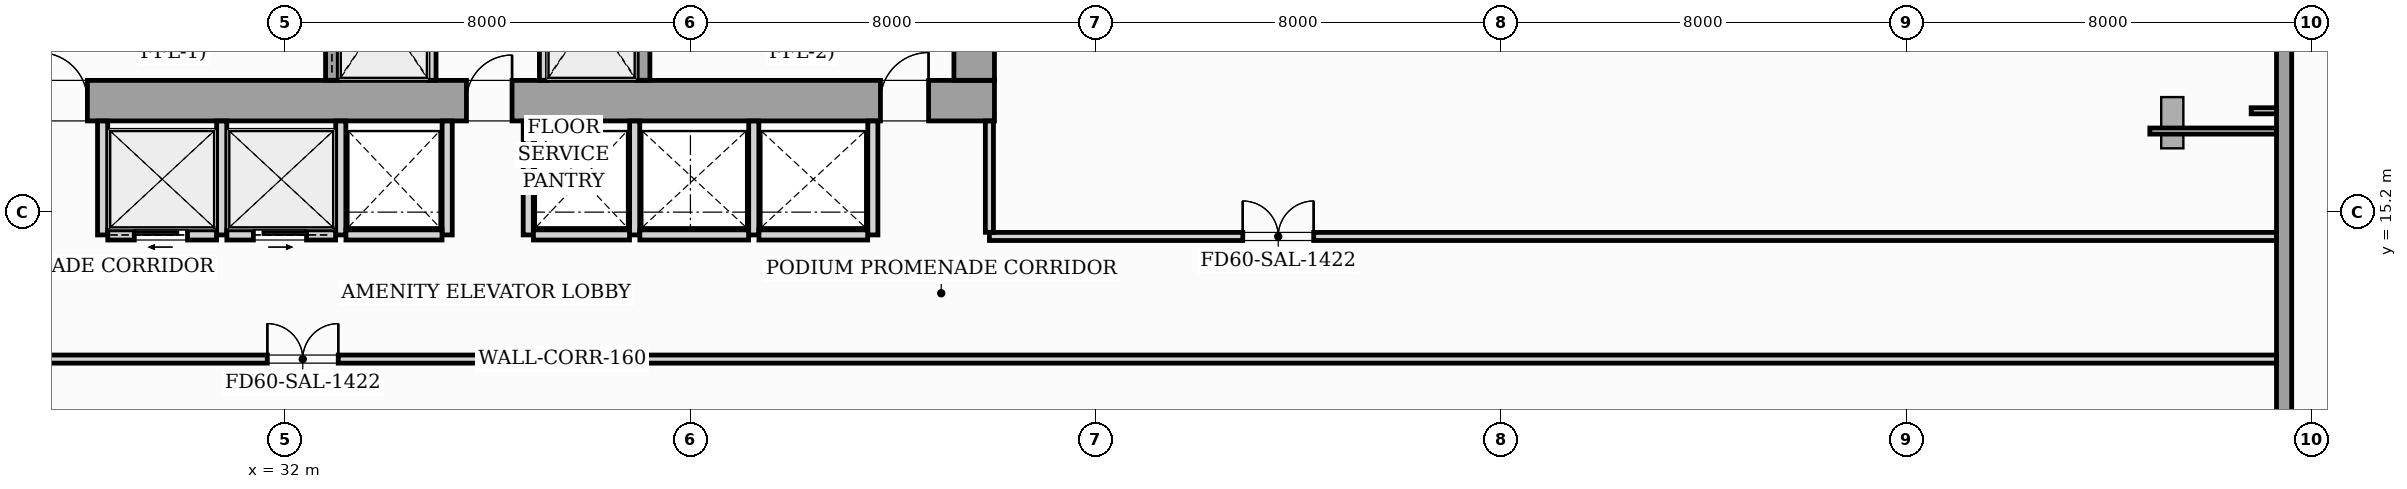
"""IFC4 building model, lengths in metres.
Left out: names, types, materials, properties, quantities, classifications, styles, units other than length and angle.
Written with IfcOpenShell. Run it as: python <this file> out.ifc"""

import sys

from ifc_helpers import new_model, si_unit, direction, frame, frame_2d, origin, origin_2d, place, context, subcontext, project, spatial, rectangle, i_section, extrude, source, transform, mapped, element, fill, save


model = new_model("IFC4")
c1 = context("Model", 3, precision=1e-05, world=origin(), true_north=direction((0.0, 1.0)))
c2 = subcontext(c1, "Body", "Model", "MODEL_VIEW")
j1 = project(units=[si_unit("LENGTHUNIT", "METRE"), si_unit("PLANEANGLEUNIT", "RADIAN")], contexts=[c1])
p1 = place(None, origin())
s1 = spatial("IfcSite", under=j1, at=p1, CompositionType="ELEMENT")
p2 = place(p1, origin())
s2 = spatial("IfcBuilding", under=s1, at=p2, CompositionType="ELEMENT")
p3 = place(p2, frame((0.0, 0.0, 14.0)))
s3 = spatial("IfcBuildingStorey", under=s2, at=p3, CompositionType="ELEMENT", Elevation=14.0)
m1 = source(origin(), c2, "Body", "SweptSolid", [
    extrude(i_section(OverallWidth=0.437, OverallDepth=0.514, WebThickness=0.061, FlangeThickness=0.097, FilletRadius=0.018, at=origin_2d()), origin(), (0.0, 0.0, 1.0), 4.496),
])
for number, where, z_axis, x_axis in (
    (1, (33.12, 17.4, 0.002), (0.0, 0.0, 1.0), (1.0, 0.0, 0.0)),
    (2, (38.88, 17.4, 0.002), (0.0, 0.0, 1.0), (1.0, 0.0, 0.0)),
    (3, (45.6, 17.4, 0.002), (0.0, 0.0, 1.0), (1.0, 0.0, 0.0)),
):
    element("IfcColumn", number, at=place(p3, frame(where, z_axis=z_axis, x_axis=x_axis)), inside=s3, PredefinedType="PILASTER", context=c2, shape_type="MappedRepresentation", body=[
        mapped(m1, transform((0.0, 0.0, 0.0), scale=1.0)),
    ])
m2 = source(origin(), c2, "Body", "SweptSolid", [
    extrude(i_section(OverallWidth=0.438, OverallDepth=1.011, WebThickness=0.041, FlangeThickness=0.074, FilletRadius=0.024, at=origin_2d()), origin(), (0.0, 0.0, 1.0), 5.298),
])
p4 = place(p3, frame((70.257, 17.167, 0.167), z_axis=(-0.693307662759, -0.138652316712, 0.70717750235), x_axis=(0.693446365663, 0.138680055449, 0.707036052949)))
e4 = element("IfcColumn", 4, at=p4, inside=s3, PredefinedType="COLUMN", context=c2, shape_type="MappedRepresentation", body=[
    mapped(m2, transform((0.0, 0.0, 0.0), scale=1.0)),
])
p5 = place(p3, frame((71.45, 32.85, 0.0), z_axis=(0.0, 0.0, 1.0), x_axis=(0.0, -1.0, 0.0)))
e5 = element("IfcWall", 5, at=p5, inside=s3, PredefinedType="STANDARD", context=c2, shape_type="SweptSolid", body=[
    extrude(rectangle(XDim=31.3, YDim=0.3, at=frame_2d((15.65, 0.0))), origin(), (0.0, 0.0, 1.0), 4.08),
])
p6 = place(p5, frame((7.85, 0.0, 0.0)))
e6 = element("IfcOpeningElement", 6, at=p6, cuts=e5, PredefinedType="OPENING", context=c2, shape_type="SweptSolid", body=[
    extrude(rectangle(XDim=1.6, YDim=2.1, at=frame_2d((0.8, 1.05))), frame((0.0, 0.16, 0.0), z_axis=(0.0, -1.0, 0.0), x_axis=(1.0, 0.0, 0.0)), (0.0, 0.0, 1.0), 0.32),
])
p7 = place(p5, frame((25.65, 0.0, 0.9)))
e7 = element("IfcOpeningElement", 7, at=p7, cuts=e5, PredefinedType="OPENING", context=c2, shape_type="SweptSolid", body=[
    extrude(rectangle(XDim=2.0, YDim=2.4, at=frame_2d((1.0, 1.2))), frame((0.0, 0.16, 0.0), z_axis=(0.0, -1.0, 0.0), x_axis=(1.0, 0.0, 0.0)), (0.0, 0.0, 1.0), 0.32),
])
p8 = place(p3, frame((26.0, 17.4, 0.0), z_axis=(0.0, 0.0, 1.0), x_axis=(1.0, 0.0, 0.0)))
e8 = element("IfcWall", 8, at=p8, inside=s3, PredefinedType="SHEAR", context=c2, shape_type="SweptSolid", body=[
    extrude(rectangle(XDim=20.0, YDim=0.8, at=frame_2d((10.0, 0.0))), origin(), (0.0, 0.0, 1.0), 4.5),
])
p9 = place(p8, frame((1.15, 0.0, 0.0)))
e9 = element("IfcOpeningElement", 9, at=p9, cuts=e8, PredefinedType="OPENING", context=c2, shape_type="SweptSolid", body=[
    extrude(rectangle(XDim=0.95, YDim=2.06, at=frame_2d((0.475, 1.03))), frame((0.0, 0.41, 0.0), z_axis=(0.0, -1.0, 0.0), x_axis=(1.0, 0.0, 0.0)), (0.0, 0.0, 1.0), 0.82),
])
p10 = place(p8, frame((9.58, 0.0, 0.0)))
e10 = element("IfcOpeningElement", 10, at=p10, cuts=e8, PredefinedType="OPENING", context=c2, shape_type="SweptSolid", body=[
    extrude(rectangle(XDim=0.9, YDim=2.06, at=frame_2d((0.45, 1.03))), frame((0.0, 0.41, 0.0), z_axis=(0.0, -1.0, 0.0), x_axis=(1.0, 0.0, 0.0)), (0.0, 0.0, 1.0), 0.82),
])
p11 = place(p8, frame((17.75, 0.0, 0.0)))
e11 = element("IfcOpeningElement", 11, at=p11, cuts=e8, PredefinedType="OPENING", context=c2, shape_type="SweptSolid", body=[
    extrude(rectangle(XDim=0.95, YDim=2.06, at=frame_2d((0.475, 1.03))), frame((0.0, 0.41, 0.0), z_axis=(0.0, -1.0, 0.0), x_axis=(1.0, 0.0, 0.0)), (0.0, 0.0, 1.0), 0.82),
])
p12 = place(p3, frame((45.6, 17.802, 0.0), z_axis=(0.0, 0.0, 1.0), x_axis=(0.0, 1.0, 0.0)))
e12 = element("IfcWall", 12, at=p12, inside=s3, PredefinedType="SHEAR", context=c2, shape_type="SweptSolid", body=[
    extrude(rectangle(XDim=5.796, YDim=0.8, at=frame_2d((2.898, 0.0))), origin(), (0.0, 0.0, 1.0), 4.5),
])
p13 = place(p3, frame((32.925, 17.802, 0.0), z_axis=(0.0, 0.0, 1.0), x_axis=(0.0, 1.0, 0.0)))
e13 = element("IfcWall", 13, at=p13, inside=s3, PredefinedType="SOLIDWALL", context=c2, shape_type="SweptSolid", body=[
    extrude(rectangle(XDim=2.646, YDim=0.25, at=frame_2d((1.323, 0.0))), origin(), (0.0, 0.0, 1.0), 4.5),
])
p14 = place(p13, frame((0.648, 0.0, 0.0)))
e14 = element("IfcOpeningElement", 14, at=p14, cuts=e13, PredefinedType="OPENING", context=c2, shape_type="SweptSolid", body=[
    extrude(rectangle(XDim=1.1, YDim=2.08, at=frame_2d((0.55, 1.04))), frame((0.0, 0.135, 0.0), z_axis=(0.0, -1.0, 0.0), x_axis=(1.0, 0.0, 0.0)), (0.0, 0.0, 1.0), 0.27),
])
for number, where, z_axis, x_axis in (
    (15, (34.9, 17.802, 0.0), (0.0, 0.0, 1.0), (0.0, 1.0, 0.0)),
    (16, (37.1, 17.802, 0.0), (0.0, 0.0, 1.0), (0.0, 1.0, 0.0)),
):
    element("IfcWall", number, at=place(p3, frame(where, z_axis=z_axis, x_axis=x_axis)), inside=s3, PredefinedType="PARTITIONING", context=c2, shape_type="SweptSolid", body=[
        extrude(rectangle(XDim=2.646, YDim=0.16, at=frame_2d((1.323, 0.0))), origin(), (0.0, 0.0, 1.0), 4.08),
    ])
p15 = place(p3, frame((39.075, 17.802, 0.0), z_axis=(0.0, 0.0, 1.0), x_axis=(0.0, 1.0, 0.0)))
e17 = element("IfcWall", 17, at=p15, inside=s3, PredefinedType="SOLIDWALL", context=c2, shape_type="SweptSolid", body=[
    extrude(rectangle(XDim=2.646, YDim=0.25, at=frame_2d((1.323, 0.0))), origin(), (0.0, 0.0, 1.0), 4.5),
])
p16 = place(p15, frame((0.648, 0.0, 0.0)))
e18 = element("IfcOpeningElement", 18, at=p16, cuts=e17, PredefinedType="OPENING", context=c2, shape_type="SweptSolid", body=[
    extrude(rectangle(XDim=1.1, YDim=2.08, at=frame_2d((0.55, 1.04))), frame((0.0, 0.135, 0.0), z_axis=(0.0, -1.0, 0.0), x_axis=(1.0, 0.0, 0.0)), (0.0, 0.0, 1.0), 0.27),
])
for number, where, z_axis, x_axis in (
    (19, (28.4, 14.75, 0.0), (0.0, 0.0, 1.0), (0.0, 1.0, 0.0)),
    (20, (30.75, 14.75, 0.0), (0.0, 0.0, 1.0), (0.0, 1.0, 0.0)),
    (21, (33.1, 14.75, 0.0), (0.0, 0.0, 1.0), (0.0, 1.0, 0.0)),
):
    element("IfcWall", number, at=place(p3, frame(where, z_axis=z_axis, x_axis=x_axis)), inside=s3, PredefinedType="PARTITIONING", context=c2, shape_type="SweptSolid", body=[
        extrude(rectangle(XDim=2.248, YDim=0.2, at=frame_2d((1.124, 0.0))), origin(), (0.0, 0.0, 1.0), 4.08),
    ])
p17 = place(p3, frame((28.502, 14.75, 0.0), z_axis=(0.0, 0.0, 1.0), x_axis=(1.0, 0.0, 0.0)))
e22 = element("IfcWall", 22, at=p17, inside=s3, PredefinedType="PARTITIONING", context=c2, shape_type="SweptSolid", body=[
    extrude(rectangle(XDim=2.146, YDim=0.2, at=frame_2d((1.073, 0.0))), origin(), (0.0, 0.0, 1.0), 4.08),
])
p18 = place(p17, frame((0.523, 0.0, 0.0)))
e23 = element("IfcOpeningElement", 23, at=p18, cuts=e22, PredefinedType="OPENING", context=c2, shape_type="SweptSolid", body=[
    extrude(rectangle(XDim=1.05, YDim=2.08, at=frame_2d((0.525, 1.04))), frame((0.0, 0.11, 0.0), z_axis=(0.0, -1.0, 0.0), x_axis=(1.0, 0.0, 0.0)), (0.0, 0.0, 1.0), 0.22),
])
p19 = place(p3, frame((30.852, 14.75, 0.0), z_axis=(0.0, 0.0, 1.0), x_axis=(1.0, 0.0, 0.0)))
e24 = element("IfcWall", 24, at=p19, inside=s3, PredefinedType="PARTITIONING", context=c2, shape_type="SweptSolid", body=[
    extrude(rectangle(XDim=2.146, YDim=0.2, at=frame_2d((1.073, 0.0))), origin(), (0.0, 0.0, 1.0), 4.08),
])
p20 = place(p19, frame((0.523, 0.0, 0.0)))
e25 = element("IfcOpeningElement", 25, at=p20, cuts=e24, PredefinedType="OPENING", context=c2, shape_type="SweptSolid", body=[
    extrude(rectangle(XDim=1.05, YDim=2.08, at=frame_2d((0.525, 1.04))), frame((0.0, 0.11, 0.0), z_axis=(0.0, -1.0, 0.0), x_axis=(1.0, 0.0, 0.0)), (0.0, 0.0, 1.0), 0.22),
])
p21 = place(p3, frame((35.2, 14.75, 0.0), z_axis=(0.0, 0.0, 1.0), x_axis=(0.0, 1.0, 0.0)))
e26 = element("IfcWall", 26, at=p21, inside=s3, PredefinedType="PARTITIONING", context=c2, shape_type="SweptSolid", body=[
    extrude(rectangle(XDim=2.248, YDim=0.2, at=frame_2d((1.124, 0.0))), origin(), (0.0, 0.0, 1.0), 4.08),
])
p22 = place(p3, frame((33.202, 14.75, 0.0), z_axis=(0.0, 0.0, 1.0), x_axis=(1.0, 0.0, 0.0)))
e27 = element("IfcWall", 27, at=p22, inside=s3, PredefinedType="PARTITIONING", context=c2, shape_type="SweptSolid", body=[
    extrude(rectangle(XDim=1.896, YDim=0.2, at=frame_2d((0.948, 0.0))), origin(), (0.0, 0.0, 1.0), 4.08),
])
for number, where, z_axis, x_axis in (
    (28, (36.8, 14.75, 0.0), (0.0, 0.0, 1.0), (0.0, 1.0, 0.0)),
    (29, (38.9, 14.75, 0.0), (0.0, 0.0, 1.0), (0.0, 1.0, 0.0)),
):
    element("IfcWall", number, at=place(p3, frame(where, z_axis=z_axis, x_axis=x_axis)), inside=s3, PredefinedType="PARTITIONING", context=c2, shape_type="SweptSolid", body=[
        extrude(rectangle(XDim=2.248, YDim=0.2, at=frame_2d((1.124, 0.0))), origin(), (0.0, 0.0, 1.0), 4.08),
    ])
p23 = place(p3, frame((36.902, 14.75, 0.0), z_axis=(0.0, 0.0, 1.0), x_axis=(1.0, 0.0, 0.0)))
e30 = element("IfcWall", 30, at=p23, inside=s3, PredefinedType="PARTITIONING", context=c2, shape_type="SweptSolid", body=[
    extrude(rectangle(XDim=1.896, YDim=0.2, at=frame_2d((0.948, 0.0))), origin(), (0.0, 0.0, 1.0), 4.08),
])
for number, where, z_axis, x_axis in (
    (31, (41.25, 14.75, 0.0), (0.0, 0.0, 1.0), (0.0, 1.0, 0.0)),
    (32, (43.6, 14.75, 0.0), (0.0, 0.0, 1.0), (0.0, 1.0, 0.0)),
):
    element("IfcWall", number, at=place(p3, frame(where, z_axis=z_axis, x_axis=x_axis)), inside=s3, PredefinedType="PARTITIONING", context=c2, shape_type="SweptSolid", body=[
        extrude(rectangle(XDim=2.248, YDim=0.2, at=frame_2d((1.124, 0.0))), origin(), (0.0, 0.0, 1.0), 4.08),
    ])
for number, where, z_axis, x_axis in (
    (33, (39.002, 14.75, 0.0), (0.0, 0.0, 1.0), (1.0, 0.0, 0.0)),
    (34, (41.352, 14.75, 0.0), (0.0, 0.0, 1.0), (1.0, 0.0, 0.0)),
):
    element("IfcWall", number, at=place(p3, frame(where, z_axis=z_axis, x_axis=x_axis)), inside=s3, PredefinedType="PARTITIONING", context=c2, shape_type="SweptSolid", body=[
        extrude(rectangle(XDim=2.146, YDim=0.2, at=frame_2d((1.073, 0.0))), origin(), (0.0, 0.0, 1.0), 4.08),
    ])
p24 = place(p3, frame((3.65, 12.3, 0.0), z_axis=(0.0, 0.0, 1.0), x_axis=(1.0, 0.0, 0.0)))
e35 = element("IfcWall", 35, at=p24, inside=s3, PredefinedType="PARTITIONING", context=c2, shape_type="SweptSolid", body=[
    extrude(rectangle(XDim=67.648, YDim=0.16, at=frame_2d((33.824, 0.0))), origin(), (0.0, 0.0, 1.0), 4.08),
])
p25 = place(p24, frame((6.5, 0.0, 0.0)))
e36 = element("IfcOpeningElement", 36, at=p25, cuts=e35, PredefinedType="OPENING", context=c2, shape_type="SweptSolid", body=[
    extrude(rectangle(XDim=1.4, YDim=2.08, at=frame_2d((0.7, 1.04))), frame((0.0, 0.09, 0.0), z_axis=(0.0, -1.0, 0.0), x_axis=(1.0, 0.0, 0.0)), (0.0, 0.0, 1.0), 0.18),
])
p26 = place(p24, frame((28.0, 0.0, 0.0)))
e37 = element("IfcOpeningElement", 37, at=p26, cuts=e35, PredefinedType="OPENING", context=c2, shape_type="SweptSolid", body=[
    extrude(rectangle(XDim=1.4, YDim=2.08, at=frame_2d((0.7, 1.04))), frame((0.0, 0.09, 0.0), z_axis=(0.0, -1.0, 0.0), x_axis=(1.0, 0.0, 0.0)), (0.0, 0.0, 1.0), 0.18),
])
p27 = place(p3, frame((45.9, 14.72, 0.0), z_axis=(0.0, 0.0, 1.0), x_axis=(1.0, 0.0, 0.0)))
e38 = element("IfcWall", 38, at=p27, inside=s3, PredefinedType="PARTITIONING", context=c2, shape_type="SweptSolid", body=[
    extrude(rectangle(XDim=25.398, YDim=0.16, at=frame_2d((12.699, 0.0))), origin(), (0.0, 0.0, 1.0), 4.08),
])
p28 = place(p27, frame((5.0, 0.0, 0.0)))
e39 = element("IfcOpeningElement", 39, at=p28, cuts=e38, PredefinedType="OPENING", context=c2, shape_type="SweptSolid", body=[
    extrude(rectangle(XDim=1.4, YDim=2.08, at=frame_2d((0.7, 1.04))), frame((0.0, 0.09, 0.0), z_axis=(0.0, -1.0, 0.0), x_axis=(1.0, 0.0, 0.0)), (0.0, 0.0, 1.0), 0.18),
])
p29 = place(p3, frame((45.9, 14.802, 0.0), z_axis=(0.0, 0.0, 1.0), x_axis=(0.0, 1.0, 0.0)))
e40 = element("IfcWall", 40, at=p29, inside=s3, PredefinedType="PARTITIONING", context=c2, shape_type="SweptSolid", body=[
    extrude(rectangle(XDim=2.196, YDim=0.16, at=frame_2d((1.098, 0.0))), origin(), (0.0, 0.0, 1.0), 4.08),
])
p30 = place(p3, frame((68.8, 16.8, 0.0), z_axis=(0.0, 0.0, 1.0), x_axis=(1.0, 0.0, 0.0)))
e41 = element("IfcWall", 41, at=p30, inside=s3, PredefinedType="PARTITIONING", context=c2, shape_type="SweptSolid", body=[
    extrude(rectangle(XDim=2.498, YDim=0.12, at=frame_2d((1.249, 0.0))), origin(), (0.0, 0.0, 1.0), 4.08),
])
p31 = place(p3, frame((70.8, 17.2, 0.0), z_axis=(0.0, 0.0, 1.0), x_axis=(1.0, 0.0, 0.0)))
e42 = element("IfcWall", 42, at=p31, inside=s3, PredefinedType="PARTITIONING", context=c2, shape_type="SweptSolid", body=[
    extrude(rectangle(XDim=0.498, YDim=0.12, at=frame_2d((0.249, 0.0))), origin(), (0.0, 0.0, 1.0), 4.08),
])
m3 = source(origin(), c2, "Body", "SweptSolid", [
    extrude(rectangle(XDim=0.95, YDim=2.06, at=frame_2d((0.475, 1.03))), frame((0.0, 0.025, 0.0), z_axis=(0.0, -1.0, 0.0), x_axis=(1.0, 0.0, 0.0)), (0.0, 0.0, 1.0), 0.05),
])
p32 = place(p9, origin())
e43 = element("IfcDoor", 43, at=p32, inside=s3, OperationType="SINGLE_SWING_LEFT", PredefinedType="DOOR", context=c2, shape_type="MappedRepresentation", body=[
    mapped(m3, transform((0.0, 0.0, 0.0), scale=1.0)),
])
fill(e9, e43)
m4 = source(origin(), c2, "Body", "SweptSolid", [
    extrude(rectangle(XDim=0.9, YDim=2.06, at=frame_2d((0.45, 1.03))), frame((0.0, 0.025, 0.0), z_axis=(0.0, -1.0, 0.0), x_axis=(1.0, 0.0, 0.0)), (0.0, 0.0, 1.0), 0.05),
])
p33 = place(p10, origin())
e44 = element("IfcDoor", 44, at=p33, inside=s3, OperationType="SINGLE_SWING_RIGHT", PredefinedType="DOOR", context=c2, shape_type="MappedRepresentation", body=[
    mapped(m4, transform((0.0, 0.0, 0.0), scale=1.0)),
])
fill(e10, e44)
p34 = place(p11, origin())
e45 = element("IfcDoor", 45, at=p34, inside=s3, OperationType="SINGLE_SWING_RIGHT", PredefinedType="DOOR", context=c2, shape_type="MappedRepresentation", body=[
    mapped(m3, transform((0.0, 0.0, 0.0), scale=1.0)),
])
fill(e11, e45)
m5 = source(origin(), c2, "Body", "SweptSolid", [
    extrude(rectangle(XDim=1.05, YDim=2.08, at=frame_2d((0.525, 1.04))), frame((0.0, 0.025, 0.0), z_axis=(0.0, -1.0, 0.0), x_axis=(1.0, 0.0, 0.0)), (0.0, 0.0, 1.0), 0.05),
])
p35 = place(p18, origin())
e46 = element("IfcDoor", 46, at=p35, inside=s3, OperationType="SLIDING_TO_LEFT", PredefinedType="DOOR", context=c2, shape_type="MappedRepresentation", body=[
    mapped(m5, transform((0.0, 0.0, 0.0), scale=1.0)),
])
fill(e23, e46)
p36 = place(p20, origin())
e47 = element("IfcDoor", 47, at=p36, inside=s3, OperationType="SLIDING_TO_RIGHT", PredefinedType="DOOR", context=c2, shape_type="MappedRepresentation", body=[
    mapped(m5, transform((0.0, 0.0, 0.0), scale=1.0)),
])
fill(e25, e47)
m6 = source(origin(), c2, "Body", "SweptSolid", [
    extrude(rectangle(XDim=1.4, YDim=2.08, at=frame_2d((0.7, 1.04))), frame((0.0, 0.025, 0.0), z_axis=(0.0, -1.0, 0.0), x_axis=(1.0, 0.0, 0.0)), (0.0, 0.0, 1.0), 0.05),
])
p37 = place(p26, origin())
e48 = element("IfcDoor", 48, at=p37, inside=s3, OperationType="DOUBLE_DOOR_SINGLE_SWING", PredefinedType="DOOR", context=c2, shape_type="MappedRepresentation", body=[
    mapped(m6, transform((0.0, 0.0, 0.0), scale=1.0)),
])
fill(e37, e48)
p38 = place(p28, origin())
e49 = element("IfcDoor", 49, at=p38, inside=s3, OperationType="DOUBLE_DOOR_SINGLE_SWING", PredefinedType="DOOR", context=c2, shape_type="MappedRepresentation", body=[
    mapped(m6, transform((0.0, 0.0, 0.0), scale=1.0)),
])
fill(e39, e49)
save(model, sys.argv[1])
